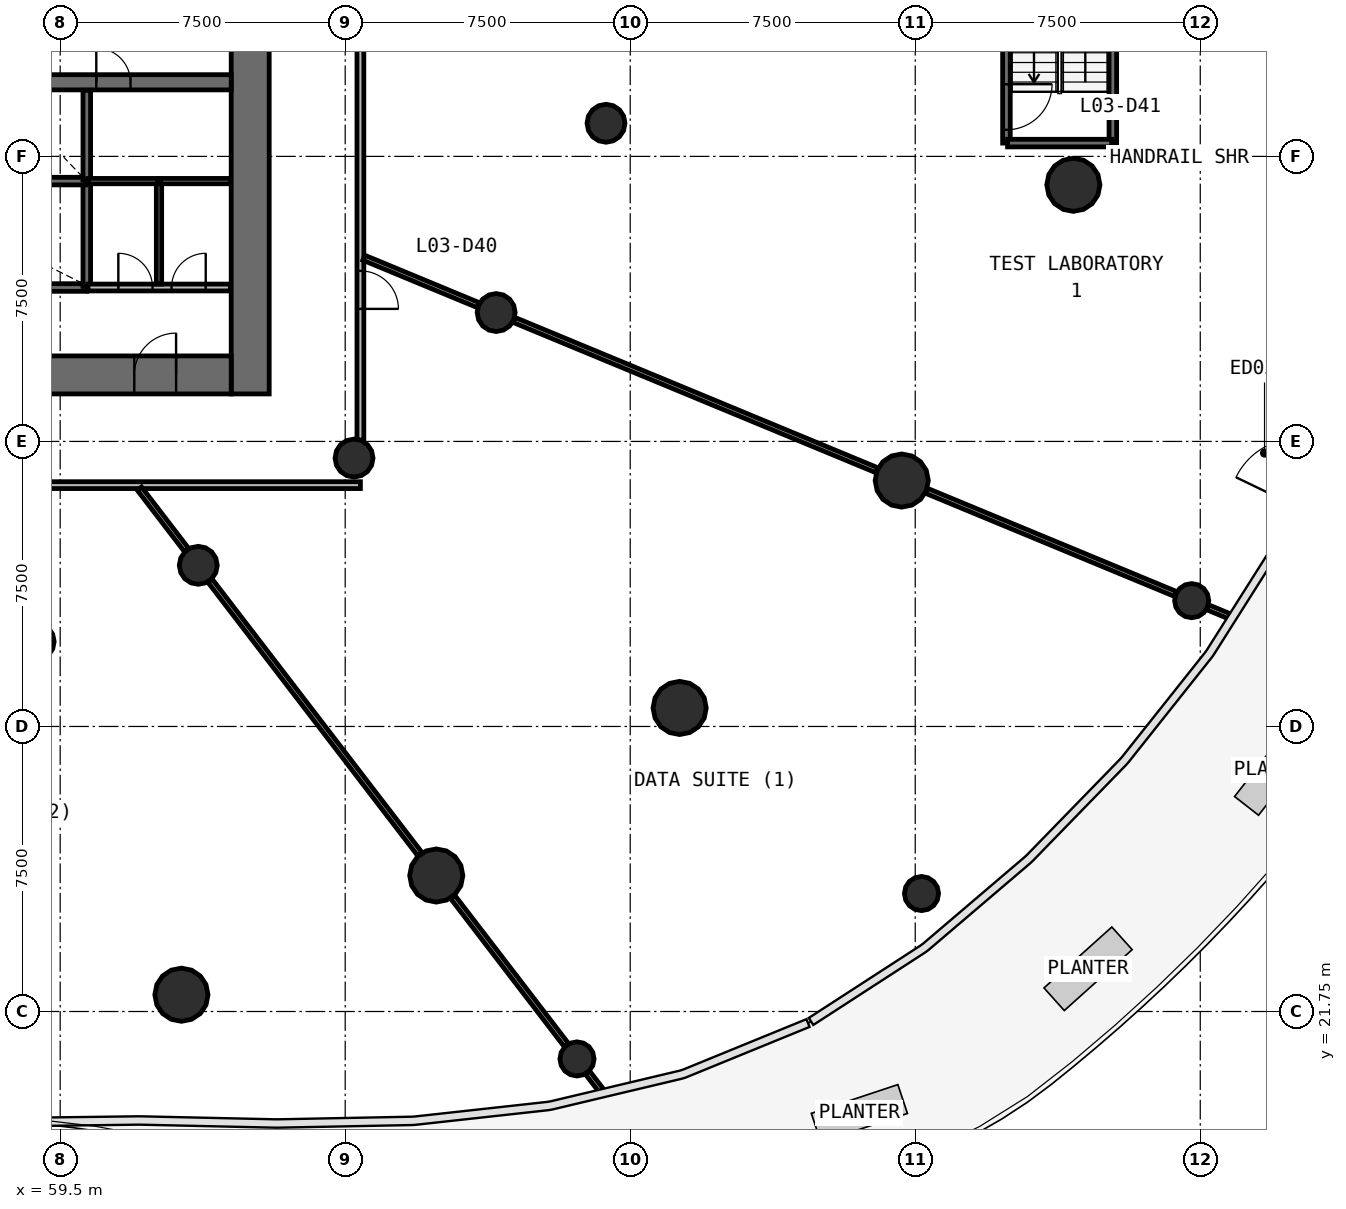
"""IFC4 building model, lengths in metres.
Left out: names, types, materials, properties, quantities, classifications, styles, units other than length and angle.
Written with IfcOpenShell. Run it as: python <this file> out.ifc"""

import sys

from ifc_helpers import new_model, si_unit, direction, frame, frame_2d, origin, origin_2d, place, context, subcontext, project, spatial, rectangle, circle, extrude, source, transform, mapped, element, fill, save


model = new_model("IFC4")
c1 = context("Model", 3, precision=1e-05, world=origin(), true_north=direction((0.0, 1.0)))
c2 = subcontext(c1, "Body", "Model", "MODEL_VIEW")
j1 = project(units=[si_unit("LENGTHUNIT", "METRE"), si_unit("PLANEANGLEUNIT", "RADIAN")], contexts=[c1])
p1 = place(None, origin())
s1 = spatial("IfcSite", under=j1, at=p1, CompositionType="ELEMENT")
p2 = place(p1, origin())
s2 = spatial("IfcBuilding", under=s1, at=p2, CompositionType="ELEMENT")
p3 = place(p2, frame((0.0, 0.0, 13.8)))
s3 = spatial("IfcBuildingStorey", under=s2, at=p3, CompositionType="ELEMENT", Elevation=13.8)
p4 = place(p3, frame((64.5, 38.0, 0.0), z_axis=(0.0, 0.0, 1.0), x_axis=(0.0, 1.0, 0.0)))
e1 = element("IfcWall", 1, at=p4, inside=s3, PredefinedType="SHEAR", context=c2, shape_type="SweptSolid", body=[
    extrude(rectangle(XDim=20.0, YDim=1.0, at=frame_2d((10.0, 0.0))), origin(), (0.0, 0.0, 1.0), 4.4),
])
p5 = place(p4, frame((9.1, 0.0, 0.0)))
e2 = element("IfcOpeningElement", 2, at=p5, cuts=e1, PredefinedType="OPENING", context=c2, shape_type="SweptSolid", body=[
    extrude(rectangle(XDim=1.8, YDim=2.1, at=frame_2d((0.9, 1.05))), frame((0.0, 0.51, 0.0), z_axis=(0.0, -1.0, 0.0), x_axis=(1.0, 0.0, 0.0)), (0.0, 0.0, 1.0), 1.02),
])
p6 = place(p3, frame((40.0, 38.5, 0.0), z_axis=(0.0, 0.0, 1.0), x_axis=(1.0, 0.0, 0.0)))
e3 = element("IfcWall", 3, at=p6, inside=s3, PredefinedType="SHEAR", context=c2, shape_type="SweptSolid", body=[
    extrude(rectangle(XDim=24.0, YDim=1.0, at=frame_2d((12.0, 0.0))), origin(), (0.0, 0.0, 1.0), 4.4),
])
p7 = place(p6, frame((21.45, 0.0, 0.0)))
e4 = element("IfcOpeningElement", 4, at=p7, cuts=e3, PredefinedType="OPENING", context=c2, shape_type="SweptSolid", body=[
    extrude(rectangle(XDim=1.1, YDim=2.1, at=frame_2d((0.55, 1.05))), frame((0.0, 0.51, 0.0), z_axis=(0.0, -1.0, 0.0), x_axis=(1.0, 0.0, 0.0)), (0.0, 0.0, 1.0), 1.02),
])
p8 = place(p6, frame((1.95, 0.0, 0.0)))
e5 = element("IfcOpeningElement", 5, at=p8, cuts=e3, PredefinedType="OPENING", context=c2, shape_type="SweptSolid", body=[
    extrude(rectangle(XDim=1.1, YDim=2.1, at=frame_2d((0.55, 1.05))), frame((0.0, 0.51, 0.0), z_axis=(0.0, -1.0, 0.0), x_axis=(1.0, 0.0, 0.0)), (0.0, 0.0, 1.0), 1.02),
])
p9 = place(p3, frame((40.0, 46.2, 0.0), z_axis=(0.0, 0.0, 1.0), x_axis=(1.0, 0.0, 0.0)))
e6 = element("IfcWall", 6, at=p9, inside=s3, PredefinedType="SHEAR", context=c2, shape_type="SweptSolid", body=[
    extrude(rectangle(XDim=24.0, YDim=0.4, at=frame_2d((12.0, 0.0))), origin(), (0.0, 0.0, 1.0), 4.4),
])
p10 = place(p9, frame((4.5, 0.0, 0.0)))
e7 = element("IfcOpeningElement", 7, at=p10, cuts=e6, PredefinedType="OPENING", context=c2, shape_type="SweptSolid", body=[
    extrude(rectangle(XDim=1.1, YDim=2.1, at=frame_2d((0.55, 1.05))), frame((0.0, 0.21, 0.0), z_axis=(0.0, -1.0, 0.0), x_axis=(1.0, 0.0, 0.0)), (0.0, 0.0, 1.0), 0.42),
])
p11 = place(p9, frame((7.0, 0.0, 0.0)))
e8 = element("IfcOpeningElement", 8, at=p11, cuts=e6, PredefinedType="OPENING", context=c2, shape_type="SweptSolid", body=[
    extrude(rectangle(XDim=1.1, YDim=2.1, at=frame_2d((0.55, 1.05))), frame((0.0, 0.21, 0.0), z_axis=(0.0, -1.0, 0.0), x_axis=(1.0, 0.0, 0.0)), (0.0, 0.0, 1.0), 0.42),
])
p12 = place(p9, frame((9.5, 0.0, 0.0)))
e9 = element("IfcOpeningElement", 9, at=p12, cuts=e6, PredefinedType="OPENING", context=c2, shape_type="SweptSolid", body=[
    extrude(rectangle(XDim=1.1, YDim=2.1, at=frame_2d((0.55, 1.05))), frame((0.0, 0.21, 0.0), z_axis=(0.0, -1.0, 0.0), x_axis=(1.0, 0.0, 0.0)), (0.0, 0.0, 1.0), 0.42),
])
p13 = place(p9, frame((20.45, 0.0, 0.0)))
e10 = element("IfcOpeningElement", 10, at=p13, cuts=e6, PredefinedType="OPENING", context=c2, shape_type="SweptSolid", body=[
    extrude(rectangle(XDim=0.9, YDim=2.1, at=frame_2d((0.45, 1.05))), frame((0.0, 0.21, 0.0), z_axis=(0.0, -1.0, 0.0), x_axis=(1.0, 0.0, 0.0)), (0.0, 0.0, 1.0), 0.42),
])
p14 = place(p9, frame((2.65, 0.0, 0.0)))
e11 = element("IfcOpeningElement", 11, at=p14, cuts=e6, PredefinedType="OPENING", context=c2, shape_type="SweptSolid", body=[
    extrude(rectangle(XDim=0.9, YDim=2.1, at=frame_2d((0.45, 1.05))), frame((0.0, 0.21, 0.0), z_axis=(0.0, -1.0, 0.0), x_axis=(1.0, 0.0, 0.0)), (0.0, 0.0, 1.0), 0.42),
])
p15 = place(p9, frame((11.65, 0.0, 0.0)))
e12 = element("IfcOpeningElement", 12, at=p15, cuts=e6, PredefinedType="OPENING", context=c2, shape_type="SweptSolid", body=[
    extrude(rectangle(XDim=0.9, YDim=2.1, at=frame_2d((0.45, 1.05))), frame((0.0, 0.21, 0.0), z_axis=(0.0, -1.0, 0.0), x_axis=(1.0, 0.0, 0.0)), (0.0, 0.0, 1.0), 0.42),
])
m1 = source(origin(), c2, "Body", "SweptSolid", [
    extrude(circle(Radius=0.7, at=origin_2d()), origin(), (0.0, 0.0, 1.0), 4.4),
])
for number, where, z_axis, x_axis in (
    (13, (62.69, 22.191, 0.0), (0.0, 0.0, 1.0), (1.0, 0.0, 0.0)),
    (14, (69.396, 25.328, 0.0), (0.0, 0.0, 1.0), (1.0, 0.0, 0.0)),
    (15, (75.801, 29.737, 0.0), (0.0, 0.0, 1.0), (1.0, 0.0, 0.0)),
    (16, (81.645, 35.721, 0.0), (0.0, 0.0, 1.0), (1.0, 0.0, 0.0)),
    (17, (86.161, 43.503, 0.0), (0.0, 0.0, 1.0), (1.0, 0.0, 0.0)),
):
    element("IfcColumn", number, at=place(p3, frame(where, z_axis=z_axis, x_axis=x_axis)), inside=s3, PredefinedType="COLUMN", context=c2, shape_type="MappedRepresentation", body=[
        mapped(m1, transform((0.0, 0.0, 0.0), scale=1.0)),
    ])
m2 = source(origin(), c2, "Body", "SweptSolid", [
    extrude(circle(Radius=0.5, at=origin_2d()), origin(), (0.0, 0.0, 1.0), 4.4),
])
for number, where, z_axis, x_axis in (
    (18, (58.842, 31.482, 0.0), (0.0, 0.0, 1.0), (1.0, 0.0, 0.0)),
    (19, (63.134, 33.49, 0.0), (0.0, 0.0, 1.0), (1.0, 0.0, 0.0)),
    (20, (67.232, 36.312, 0.0), (0.0, 0.0, 1.0), (1.0, 0.0, 0.0)),
    (21, (70.972, 40.141, 0.0), (0.0, 0.0, 1.0), (1.0, 0.0, 0.0)),
    (22, (73.863, 45.122, 0.0), (0.0, 0.0, 1.0), (1.0, 0.0, 0.0)),
):
    element("IfcColumn", number, at=place(p3, frame(where, z_axis=z_axis, x_axis=x_axis)), inside=s3, PredefinedType="COLUMN", context=c2, shape_type="MappedRepresentation", body=[
        mapped(m2, transform((0.0, 0.0, 0.0), scale=1.0)),
    ])
m3 = source(origin(), c2, "Body", "SweptSolid", [
    extrude(circle(Radius=0.45, at=origin_2d()), origin(), (0.0, 0.0, 1.0), 4.05),
])
for number, where, z_axis, x_axis in (
    (23, (73.1, 20.503, 0.0), (0.0, 0.0, 1.0), (1.0, 0.0, 0.0)),
    (24, (82.165, 24.854, 0.0), (0.0, 0.0, 1.0), (1.0, 0.0, 0.0)),
    (25, (89.275, 32.56, 0.0), (0.0, 0.0, 1.0), (1.0, 0.0, 0.0)),
):
    element("IfcColumn", number, at=place(p3, frame(where, z_axis=z_axis, x_axis=x_axis)), inside=s3, PredefinedType="COLUMN", context=c2, shape_type="MappedRepresentation", body=[
        mapped(m3, transform((0.0, 0.0, 0.0), scale=1.0)),
    ])
p16 = place(p3, frame((53.6, 40.8, 0.0), z_axis=(0.0, 0.0, 1.0), x_axis=(1.0, 0.0, 0.0)))
e26 = element("IfcWall", 26, at=p16, inside=s3, PredefinedType="SOLIDWALL", context=c2, shape_type="SweptSolid", body=[
    extrude(rectangle(XDim=6.6, YDim=0.2, at=frame_2d((3.3, 0.0))), origin(), (0.0, 0.0, 1.0), 4.05),
])
p17 = place(p16, frame((0.3, 0.0, 0.0)))
e27 = element("IfcOpeningElement", 27, at=p17, cuts=e26, PredefinedType="OPENING", context=c2, shape_type="SweptSolid", body=[
    extrude(rectangle(XDim=1.2, YDim=2.1, at=frame_2d((0.6, 1.05))), frame((0.0, 0.11, 0.0), z_axis=(0.0, -1.0, 0.0), x_axis=(1.0, 0.0, 0.0)), (0.0, 0.0, 1.0), 0.22),
])
p18 = place(p3, frame((87.2, 44.6, 0.0), z_axis=(0.0, 0.0, 1.0), x_axis=(0.0, 1.0, 0.0)))
e28 = element("IfcWall", 28, at=p18, inside=s3, PredefinedType="SOLIDWALL", context=c2, shape_type="SweptSolid", body=[
    extrude(rectangle(XDim=6.6, YDim=0.2, at=frame_2d((3.3, 0.0))), origin(), (0.0, 0.0, 1.0), 4.05),
])
p19 = place(p3, frame((84.4, 51.2, 0.0), z_axis=(0.0, 0.0, 1.0), x_axis=(0.0, -1.0, 0.0)))
e29 = element("IfcWall", 29, at=p19, inside=s3, PredefinedType="SOLIDWALL", context=c2, shape_type="SweptSolid", body=[
    extrude(rectangle(XDim=6.6, YDim=0.2, at=frame_2d((3.3, 0.0))), origin(), (0.0, 0.0, 1.0), 4.05),
])
p20 = place(p19, frame((5.05, 0.0, 0.0)))
e30 = element("IfcOpeningElement", 30, at=p20, cuts=e29, PredefinedType="OPENING", context=c2, shape_type="SweptSolid", body=[
    extrude(rectangle(XDim=1.2, YDim=2.1, at=frame_2d((0.6, 1.05))), frame((0.0, 0.11, 0.0), z_axis=(0.0, -1.0, 0.0), x_axis=(1.0, 0.0, 0.0)), (0.0, 0.0, 1.0), 0.22),
])
p21 = place(p3, frame((60.2, 40.83, 0.0), z_axis=(0.0, 0.0, 1.0), x_axis=(0.0, 1.0, 0.0)))
e31 = element("IfcWall", 31, at=p21, inside=s3, PredefinedType="SOLIDWALL", context=c2, shape_type="SweptSolid", body=[
    extrude(rectangle(XDim=2.77, YDim=0.2, at=frame_2d((1.385, 0.0))), origin(), (0.0, 0.0, 1.0), 4.05),
])
p22 = place(p3, frame((84.43, 44.6, 0.0), z_axis=(0.0, 0.0, 1.0), x_axis=(1.0, 0.0, 0.0)))
e32 = element("IfcWall", 32, at=p22, inside=s3, PredefinedType="SOLIDWALL", context=c2, shape_type="SweptSolid", body=[
    extrude(rectangle(XDim=2.74, YDim=0.2, at=frame_2d((1.37, 0.0))), origin(), (0.0, 0.0, 1.0), 4.05),
])
p23 = place(p3, frame((57.73, 43.6, 0.0), z_axis=(0.0, 0.0, 1.0), x_axis=(1.0, 0.0, 0.0)))
e33 = element("IfcWall", 33, at=p23, inside=s3, PredefinedType="SOLIDWALL", context=c2, shape_type="SweptSolid", body=[
    extrude(rectangle(XDim=2.44, YDim=0.2, at=frame_2d((1.22, 0.0))), origin(), (0.0, 0.0, 1.0), 4.05),
])
p24 = place(p3, frame((60.2, 43.63, 0.0), z_axis=(0.0, 0.0, 1.0), x_axis=(0.0, 1.0, 0.0)))
e34 = element("IfcWall", 34, at=p24, inside=s3, PredefinedType="SOLIDWALL", context=c2, shape_type="SweptSolid", body=[
    extrude(rectangle(XDim=2.36, YDim=0.2, at=frame_2d((1.18, 0.0))), origin(), (0.0, 0.0, 1.0), 4.05),
])
p25 = place(p3, frame((67.4, 35.6, 0.0), z_axis=(0.0, 0.0, 1.0), x_axis=(-1.0, 0.0, 0.0)))
e35 = element("IfcWall", 35, at=p25, inside=s3, PredefinedType="PARTITIONING", context=c2, shape_type="SweptSolid", body=[
    extrude(rectangle(XDim=30.8, YDim=0.18, at=frame_2d((15.4, 0.0))), origin(), (0.0, 0.0, 1.0), 3.25),
])
p26 = place(p25, frame((20.95, 0.0, 0.0)))
e36 = element("IfcOpeningElement", 36, at=p26, cuts=e35, PredefinedType="OPENING", context=c2, shape_type="SweptSolid", body=[
    extrude(rectangle(XDim=1.0, YDim=2.1, at=frame_2d((0.5, 1.05))), frame((0.0, 0.1, 0.0), z_axis=(0.0, -1.0, 0.0), x_axis=(1.0, 0.0, 0.0)), (0.0, 0.0, 1.0), 0.2),
])
p27 = place(p25, frame((17.35, 0.0, 0.0)))
e37 = element("IfcOpeningElement", 37, at=p27, cuts=e35, PredefinedType="OPENING", context=c2, shape_type="SweptSolid", body=[
    extrude(rectangle(XDim=1.0, YDim=2.1, at=frame_2d((0.5, 1.05))), frame((0.0, 0.1, 0.0), z_axis=(0.0, -1.0, 0.0), x_axis=(1.0, 0.0, 0.0)), (0.0, 0.0, 1.0), 0.2),
])
p28 = place(p25, frame((14.95, 0.0, 0.0)))
e38 = element("IfcOpeningElement", 38, at=p28, cuts=e35, PredefinedType="OPENING", context=c2, shape_type="SweptSolid", body=[
    extrude(rectangle(XDim=1.0, YDim=2.1, at=frame_2d((0.5, 1.05))), frame((0.0, 0.1, 0.0), z_axis=(0.0, -1.0, 0.0), x_axis=(1.0, 0.0, 0.0)), (0.0, 0.0, 1.0), 0.2),
])
p29 = place(p3, frame((67.4, 60.37, 0.0), z_axis=(0.0, 0.0, 1.0), x_axis=(0.0, -1.0, 0.0)))
e39 = element("IfcWall", 39, at=p29, inside=s3, PredefinedType="PARTITIONING", context=c2, shape_type="SweptSolid", body=[
    extrude(rectangle(XDim=23.583, YDim=0.18, at=frame_2d((11.791, 0.0))), origin(), (0.0, 0.0, 1.0), 3.25),
])
p30 = place(p29, frame((11.333, 0.0, 0.0)))
e40 = element("IfcOpeningElement", 40, at=p30, cuts=e39, PredefinedType="OPENING", context=c2, shape_type="SweptSolid", body=[
    extrude(rectangle(XDim=1.0, YDim=2.1, at=frame_2d((0.5, 1.05))), frame((0.0, 0.1, 0.0), z_axis=(0.0, -1.0, 0.0), x_axis=(1.0, 0.0, 0.0)), (0.0, 0.0, 1.0), 0.2),
])
p31 = place(p29, frame((9.133, 0.0, 0.0)))
e41 = element("IfcOpeningElement", 41, at=p31, cuts=e39, PredefinedType="OPENING", context=c2, shape_type="SweptSolid", body=[
    extrude(rectangle(XDim=1.0, YDim=2.1, at=frame_2d((0.5, 1.05))), frame((0.0, 0.1, 0.0), z_axis=(0.0, -1.0, 0.0), x_axis=(1.0, 0.0, 0.0)), (0.0, 0.0, 1.0), 0.2),
])
p32 = place(p29, frame((19.133, 0.0, 0.0)))
e42 = element("IfcOpeningElement", 42, at=p32, cuts=e39, PredefinedType="OPENING", context=c2, shape_type="SweptSolid", body=[
    extrude(rectangle(XDim=1.0, YDim=2.1, at=frame_2d((0.5, 1.05))), frame((0.0, 0.1, 0.0), z_axis=(0.0, -1.0, 0.0), x_axis=(1.0, 0.0, 0.0)), (0.0, 0.0, 1.0), 0.2),
])
p33 = place(p3, frame((60.23, 40.8, 0.0), z_axis=(0.0, 0.0, 1.0), x_axis=(1.0, 0.0, 0.0)))
e43 = element("IfcWall", 43, at=p33, inside=s3, PredefinedType="PARTITIONING", context=c2, shape_type="SweptSolid", body=[
    extrude(rectangle(XDim=3.75, YDim=0.18, at=frame_2d((1.875, 0.0))), origin(), (0.0, 0.0, 1.0), 4.05),
])
p34 = place(p33, frame((0.8, 0.0, 0.0)))
e44 = element("IfcOpeningElement", 44, at=p34, cuts=e43, PredefinedType="OPENING", context=c2, shape_type="SweptSolid", body=[
    extrude(rectangle(XDim=0.9, YDim=2.1, at=frame_2d((0.45, 1.05))), frame((0.0, 0.1, 0.0), z_axis=(0.0, -1.0, 0.0), x_axis=(1.0, 0.0, 0.0)), (0.0, 0.0, 1.0), 0.2),
])
p35 = place(p33, frame((2.2, 0.0, 0.0)))
e45 = element("IfcOpeningElement", 45, at=p35, cuts=e43, PredefinedType="OPENING", context=c2, shape_type="SweptSolid", body=[
    extrude(rectangle(XDim=0.9, YDim=2.1, at=frame_2d((0.45, 1.05))), frame((0.0, 0.1, 0.0), z_axis=(0.0, -1.0, 0.0), x_axis=(1.0, 0.0, 0.0)), (0.0, 0.0, 1.0), 0.2),
])
p36 = place(p3, frame((71.439, 39.948, 0.0), z_axis=(0.0, 0.0, 1.0), x_axis=(0.923874685699, -0.382695133396, 0.0)))
e46 = element("IfcWall", 46, at=p36, inside=s3, PredefinedType="PARTITIONING", context=c2, shape_type="SweptSolid", body=[
    extrude(rectangle(XDim=10.341, YDim=0.14, at=frame_2d((5.17, 0.0))), origin(), (0.0, 0.0, 1.0), 3.25),
])
p37 = place(p3, frame((63.441, 33.09, 0.0), z_axis=(0.0, 0.0, 1.0), x_axis=(0.608770769454, -0.793346173028, 0.0)))
e47 = element("IfcWall", 47, at=p37, inside=s3, PredefinedType="PARTITIONING", context=c2, shape_type="SweptSolid", body=[
    extrude(rectangle(XDim=9.079, YDim=0.14, at=frame_2d((4.54, 0.0))), origin(), (0.0, 0.0, 1.0), 3.25),
])
p38 = place(p3, frame((82.296, 35.451, 0.0), z_axis=(0.0, 0.0, 1.0), x_axis=(0.923879762642, -0.382682876779, 0.0)))
e48 = element("IfcWall", 48, at=p38, inside=s3, PredefinedType="PARTITIONING", context=c2, shape_type="SweptSolid", body=[
    extrude(rectangle(XDim=7.099, YDim=0.14, at=frame_2d((3.549, 0.0))), origin(), (0.0, 0.0, 1.0), 3.25),
])
p39 = place(p3, frame((69.825, 24.77, 0.0), z_axis=(0.0, 0.0, 1.0), x_axis=(0.608785402697, -0.793334944058, 0.0)))
e49 = element("IfcWall", 49, at=p39, inside=s3, PredefinedType="PARTITIONING", context=c2, shape_type="SweptSolid", body=[
    extrude(rectangle(XDim=4.924, YDim=0.14, at=frame_2d((2.462, 0.0))), origin(), (0.0, 0.0, 1.0), 3.25),
])
p40 = place(p3, frame((67.49, 41.584, 0.0), z_axis=(0.0, 0.0, 1.0), x_axis=(0.923911109142, -0.382607190737, 0.0)))
e50 = element("IfcWall", 50, at=p40, inside=s3, PredefinedType="PARTITIONING", context=c2, shape_type="SweptSolid", body=[
    extrude(rectangle(XDim=3.264, YDim=0.14, at=frame_2d((1.632, 0.0))), origin(), (0.0, 0.0, 1.0), 3.25),
])
p41 = place(p3, frame((62.1, 40.89, 0.0), z_axis=(0.0, 0.0, 1.0), x_axis=(0.0, 1.0, 0.0)))
e51 = element("IfcWall", 51, at=p41, inside=s3, PredefinedType="PARTITIONING", context=c2, shape_type="SweptSolid", body=[
    extrude(rectangle(XDim=2.71, YDim=0.14, at=frame_2d((1.355, 0.0))), origin(), (0.0, 0.0, 1.0), 3.25),
])
p42 = place(p3, frame((61.584, 35.51, 0.0), z_axis=(0.0, 0.0, 1.0), x_axis=(0.608727763541, -0.793379171578, 0.0)))
e52 = element("IfcWall", 52, at=p42, inside=s3, PredefinedType="PARTITIONING", context=c2, shape_type="SweptSolid", body=[
    extrude(rectangle(XDim=2.042, YDim=0.14, at=frame_2d((1.021, 0.0))), origin(), (0.0, 0.0, 1.0), 3.25),
])
p43 = place(p3, frame((60.23, 43.6, 0.0), z_axis=(0.0, 0.0, 1.0), x_axis=(1.0, 0.0, 0.0)))
e53 = element("IfcWall", 53, at=p43, inside=s3, PredefinedType="PARTITIONING", context=c2, shape_type="SweptSolid", body=[
    extrude(rectangle(XDim=1.84, YDim=0.14, at=frame_2d((0.92, 0.0))), origin(), (0.0, 0.0, 1.0), 3.25),
])
p44 = place(p3, frame((62.13, 43.6, 0.0), z_axis=(0.0, 0.0, 1.0), x_axis=(1.0, 0.0, 0.0)))
e54 = element("IfcWall", 54, at=p44, inside=s3, PredefinedType="PARTITIONING", context=c2, shape_type="SweptSolid", body=[
    extrude(rectangle(XDim=1.85, YDim=0.14, at=frame_2d((0.925, 0.0))), origin(), (0.0, 0.0, 1.0), 3.25),
])
p45 = place(p3, frame((89.695, 32.386, 0.0), z_axis=(0.0, 0.0, 1.0), x_axis=(0.923885189929, -0.382669773866, 0.0)))
e55 = element("IfcWall", 55, at=p45, inside=s3, PredefinedType="PARTITIONING", context=c2, shape_type="SweptSolid", body=[
    extrude(rectangle(XDim=0.633, YDim=0.14, at=frame_2d((0.316, 0.0))), origin(), (0.0, 0.0, 1.0), 3.25),
])
p46 = place(p3, frame((73.376, 20.142, 0.0), z_axis=(0.0, 0.0, 1.0), x_axis=(0.608538274095, -0.793524523226, 0.0)))
e56 = element("IfcWall", 56, at=p46, inside=s3, PredefinedType="PARTITIONING", context=c2, shape_type="SweptSolid", body=[
    extrude(rectangle(XDim=0.624, YDim=0.14, at=frame_2d((0.312, 0.0))), origin(), (0.0, 0.0, 1.0), 3.25),
])
m4 = source(origin(), c2, "Body", "SweptSolid", [
    extrude(rectangle(XDim=1.1, YDim=2.1, at=frame_2d((0.55, 1.05))), frame((0.0, 0.025, 0.0), z_axis=(0.0, -1.0, 0.0), x_axis=(1.0, 0.0, 0.0)), (0.0, 0.0, 1.0), 0.05),
])
p47 = place(p7, origin())
e57 = element("IfcDoor", 57, at=p47, inside=s3, OperationType="SINGLE_SWING_RIGHT", PredefinedType="DOOR", context=c2, shape_type="MappedRepresentation", body=[
    mapped(m4, transform((0.0, 0.0, 0.0), scale=1.0)),
])
fill(e4, e57)
m5 = source(origin(), c2, "Body", "SweptSolid", [
    extrude(rectangle(XDim=1.0, YDim=2.1, at=frame_2d((0.5, 1.05))), frame((0.0, 0.025, 0.0), z_axis=(0.0, -1.0, 0.0), x_axis=(1.0, 0.0, 0.0)), (0.0, 0.0, 1.0), 0.05),
])
p48 = place(p32, origin())
e58 = element("IfcDoor", 58, at=p48, inside=s3, OperationType="SINGLE_SWING_RIGHT", PredefinedType="DOOR", context=c2, shape_type="MappedRepresentation", body=[
    mapped(m5, transform((0.0, 0.0, 0.0), scale=1.0)),
])
fill(e42, e58)
m6 = source(origin(), c2, "Body", "SweptSolid", [
    extrude(rectangle(XDim=1.2, YDim=2.1, at=frame_2d((0.6, 1.05))), frame((0.0, 0.025, 0.0), z_axis=(0.0, -1.0, 0.0), x_axis=(1.0, 0.0, 0.0)), (0.0, 0.0, 1.0), 0.05),
])
p49 = place(p20, origin())
e59 = element("IfcDoor", 59, at=p49, inside=s3, OperationType="SINGLE_SWING_LEFT", PredefinedType="DOOR", context=c2, shape_type="MappedRepresentation", body=[
    mapped(m6, transform((0.0, 0.0, 0.0), scale=1.0)),
])
fill(e30, e59)
m7 = source(origin(), c2, "Body", "SweptSolid", [
    extrude(rectangle(XDim=0.9, YDim=2.1, at=frame_2d((0.45, 1.05))), frame((0.0, 0.025, 0.0), z_axis=(0.0, -1.0, 0.0), x_axis=(1.0, 0.0, 0.0)), (0.0, 0.0, 1.0), 0.05),
])
p50 = place(p13, origin())
e60 = element("IfcDoor", 60, at=p50, inside=s3, OperationType="SINGLE_SWING_LEFT", PredefinedType="DOOR", context=c2, shape_type="MappedRepresentation", body=[
    mapped(m7, transform((0.0, 0.0, 0.0), scale=1.0)),
])
fill(e10, e60)
p51 = place(p34, origin())
e61 = element("IfcDoor", 61, at=p51, inside=s3, OperationType="SINGLE_SWING_LEFT", PredefinedType="DOOR", context=c2, shape_type="MappedRepresentation", body=[
    mapped(m7, transform((0.0, 0.0, 0.0), scale=1.0)),
])
fill(e44, e61)
p52 = place(p35, origin())
e62 = element("IfcDoor", 62, at=p52, inside=s3, OperationType="SINGLE_SWING_RIGHT", PredefinedType="DOOR", context=c2, shape_type="MappedRepresentation", body=[
    mapped(m7, transform((0.0, 0.0, 0.0), scale=1.0)),
])
fill(e45, e62)
save(model, sys.argv[1])
